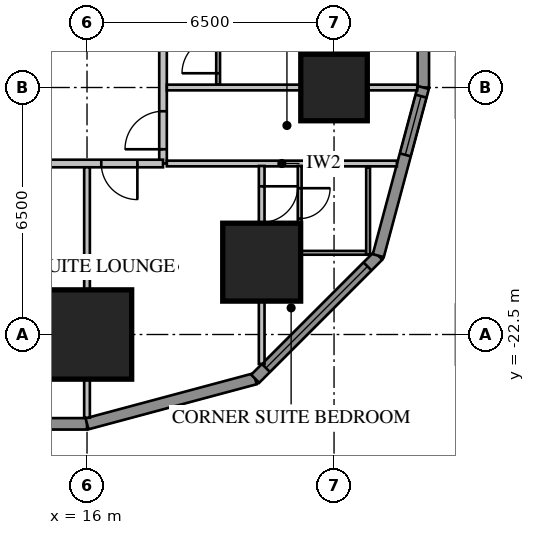
"""IFC4 building model, lengths in metres.
Left out: names, types, materials, properties, quantities, classifications, styles, units other than length and angle.
Written with IfcOpenShell. Run it as: python <this file> out.ifc"""

import sys

from ifc_helpers import new_model, si_unit, direction, frame, frame_2d, origin, origin_2d, place, context, subcontext, project, spatial, rectangle, extrude, element, fill, save


model = new_model("IFC4")
c1 = context("Model", 3, precision=1e-05, world=origin(), true_north=direction((0.0, 1.0)))
c2 = subcontext(c1, "Body", "Model", "MODEL_VIEW")
j1 = project(units=[si_unit("LENGTHUNIT", "METRE"), si_unit("PLANEANGLEUNIT", "RADIAN")], contexts=[c1])
p1 = place(None, origin())
s1 = spatial("IfcSite", under=j1, at=p1, CompositionType="ELEMENT")
p2 = place(p1, origin())
s2 = spatial("IfcBuilding", under=s1, at=p2, CompositionType="ELEMENT")
p3 = place(p2, frame((0.0, 0.0, 50.65)))
s3 = spatial("IfcBuildingStorey", under=s2, at=p3, CompositionType="ELEMENT", Elevation=50.65)
p4 = place(p3, frame((22.5, -16.0, 0.0), z_axis=(0.0, 0.0, 1.0), x_axis=(1.0, 0.0, 0.0)))
e1 = element("IfcColumn", 1, at=p4, inside=s3, PredefinedType="COLUMN", context=c2, shape_type="SweptSolid", body=[
    extrude(rectangle(XDim=1.75, YDim=1.75, at=origin_2d()), origin(), (0.0, 0.0, 1.0), 3.413),
])
p5 = place(p3, frame((16.0, -22.5, 0.0), z_axis=(0.0, 0.0, 1.0), x_axis=(1.0, 0.0, 0.0)))
e2 = element("IfcColumn", 2, at=p5, inside=s3, PredefinedType="COLUMN", context=c2, shape_type="SweptSolid", body=[
    extrude(rectangle(XDim=2.35, YDim=2.35, at=origin_2d()), origin(), (0.0, 0.0, 1.0), 3.413),
])
p6 = place(p3, frame((20.596, -20.596, 0.0), z_axis=(0.0, 0.0, 1.0), x_axis=(1.0, 0.0, 0.0)))
e3 = element("IfcColumn", 3, at=p6, inside=s3, PredefinedType="COLUMN", context=c2, shape_type="SweptSolid", body=[
    extrude(rectangle(XDim=2.05, YDim=2.05, at=origin_2d()), origin(), (0.0, 0.0, 1.0), 3.413),
])
p7 = place(p3, frame((24.85, -16.0, 0.0), z_axis=(0.0, 0.0, 1.0), x_axis=(0.0, 1.0, 0.0)))
e4 = element("IfcWall", 4, at=p7, inside=s3, PredefinedType="SOLIDWALL", context=c2, shape_type="SweptSolid", body=[
    extrude(rectangle(XDim=32.0, YDim=0.3, at=frame_2d((16.0, 0.0))), origin(), (0.0, 0.0, 1.0), 3.65),
])
p8 = place(p7, frame((1.2, 0.0, 0.75)))
e5 = element("IfcOpeningElement", 5, at=p8, cuts=e4, PredefinedType="OPENING", context=c2, shape_type="SweptSolid", body=[
    extrude(rectangle(XDim=1.6, YDim=1.8, at=frame_2d((0.8, 0.9))), frame((0.0, 0.17, 0.0), z_axis=(0.0, -1.0, 0.0), x_axis=(1.0, 0.0, 0.0)), (0.0, 0.0, 1.0), 0.34),
])
p9 = place(p7, frame((5.2, 0.0, 0.75)))
e6 = element("IfcOpeningElement", 6, at=p9, cuts=e4, PredefinedType="OPENING", context=c2, shape_type="SweptSolid", body=[
    extrude(rectangle(XDim=1.6, YDim=1.8, at=frame_2d((0.8, 0.9))), frame((0.0, 0.17, 0.0), z_axis=(0.0, -1.0, 0.0), x_axis=(1.0, 0.0, 0.0)), (0.0, 0.0, 1.0), 0.34),
])
p10 = place(p7, frame((17.2, 0.0, 0.75)))
e7 = element("IfcOpeningElement", 7, at=p10, cuts=e4, PredefinedType="OPENING", context=c2, shape_type="SweptSolid", body=[
    extrude(rectangle(XDim=1.6, YDim=1.8, at=frame_2d((0.8, 0.9))), frame((0.0, 0.17, 0.0), z_axis=(0.0, -1.0, 0.0), x_axis=(1.0, 0.0, 0.0)), (0.0, 0.0, 1.0), 0.34),
])
p11 = place(p7, frame((21.2, 0.0, 0.75)))
e8 = element("IfcOpeningElement", 8, at=p11, cuts=e4, PredefinedType="OPENING", context=c2, shape_type="SweptSolid", body=[
    extrude(rectangle(XDim=1.6, YDim=1.8, at=frame_2d((0.8, 0.9))), frame((0.0, 0.17, 0.0), z_axis=(0.0, -1.0, 0.0), x_axis=(1.0, 0.0, 0.0)), (0.0, 0.0, 1.0), 0.34),
])
p12 = place(p7, frame((25.2, 0.0, 0.75)))
e9 = element("IfcOpeningElement", 9, at=p12, cuts=e4, PredefinedType="OPENING", context=c2, shape_type="SweptSolid", body=[
    extrude(rectangle(XDim=1.6, YDim=1.8, at=frame_2d((0.8, 0.9))), frame((0.0, 0.17, 0.0), z_axis=(0.0, -1.0, 0.0), x_axis=(1.0, 0.0, 0.0)), (0.0, 0.0, 1.0), 0.34),
])
p13 = place(p7, frame((29.2, 0.0, 0.75)))
e10 = element("IfcOpeningElement", 10, at=p13, cuts=e4, PredefinedType="OPENING", context=c2, shape_type="SweptSolid", body=[
    extrude(rectangle(XDim=1.6, YDim=1.8, at=frame_2d((0.8, 0.9))), frame((0.0, 0.17, 0.0), z_axis=(0.0, -1.0, 0.0), x_axis=(1.0, 0.0, 0.0)), (0.0, 0.0, 1.0), 0.34),
])
p14 = place(p7, frame((8.8, 0.0, 0.75)))
e11 = element("IfcOpeningElement", 11, at=p14, cuts=e4, PredefinedType="OPENING", context=c2, shape_type="SweptSolid", body=[
    extrude(rectangle(XDim=2.4, YDim=1.8, at=frame_2d((1.2, 0.9))), frame((0.0, 0.17, 0.0), z_axis=(0.0, -1.0, 0.0), x_axis=(1.0, 0.0, 0.0)), (0.0, 0.0, 1.0), 0.34),
])
p15 = place(p7, frame((13.812, 0.0, 0.0)))
e12 = element("IfcOpeningElement", 12, at=p15, cuts=e4, PredefinedType="OPENING", context=c2, shape_type="SweptSolid", body=[
    extrude(rectangle(XDim=1.0, YDim=2.4, at=frame_2d((0.5, 1.2))), frame((0.0, 0.17, 0.0), z_axis=(0.0, -1.0, 0.0), x_axis=(1.0, 0.0, 0.0)), (0.0, 0.0, 1.0), 0.34),
])
p16 = place(p3, frame((-16.0, -24.85, 0.0), z_axis=(0.0, 0.0, 1.0), x_axis=(1.0, 0.0, 0.0)))
e13 = element("IfcWall", 13, at=p16, inside=s3, PredefinedType="SOLIDWALL", context=c2, shape_type="SweptSolid", body=[
    extrude(rectangle(XDim=32.0, YDim=0.3, at=frame_2d((16.0, 0.0))), origin(), (0.0, 0.0, 1.0), 3.65),
])
p17 = place(p16, frame((1.2, 0.0, 0.75)))
e14 = element("IfcOpeningElement", 14, at=p17, cuts=e13, PredefinedType="OPENING", context=c2, shape_type="SweptSolid", body=[
    extrude(rectangle(XDim=1.6, YDim=1.8, at=frame_2d((0.8, 0.9))), frame((0.0, 0.17, 0.0), z_axis=(0.0, -1.0, 0.0), x_axis=(1.0, 0.0, 0.0)), (0.0, 0.0, 1.0), 0.34),
])
p18 = place(p16, frame((5.2, 0.0, 0.75)))
e15 = element("IfcOpeningElement", 15, at=p18, cuts=e13, PredefinedType="OPENING", context=c2, shape_type="SweptSolid", body=[
    extrude(rectangle(XDim=1.6, YDim=1.8, at=frame_2d((0.8, 0.9))), frame((0.0, 0.17, 0.0), z_axis=(0.0, -1.0, 0.0), x_axis=(1.0, 0.0, 0.0)), (0.0, 0.0, 1.0), 0.34),
])
p19 = place(p16, frame((17.2, 0.0, 0.75)))
e16 = element("IfcOpeningElement", 16, at=p19, cuts=e13, PredefinedType="OPENING", context=c2, shape_type="SweptSolid", body=[
    extrude(rectangle(XDim=1.6, YDim=1.8, at=frame_2d((0.8, 0.9))), frame((0.0, 0.17, 0.0), z_axis=(0.0, -1.0, 0.0), x_axis=(1.0, 0.0, 0.0)), (0.0, 0.0, 1.0), 0.34),
])
p20 = place(p16, frame((21.2, 0.0, 0.75)))
e17 = element("IfcOpeningElement", 17, at=p20, cuts=e13, PredefinedType="OPENING", context=c2, shape_type="SweptSolid", body=[
    extrude(rectangle(XDim=1.6, YDim=1.8, at=frame_2d((0.8, 0.9))), frame((0.0, 0.17, 0.0), z_axis=(0.0, -1.0, 0.0), x_axis=(1.0, 0.0, 0.0)), (0.0, 0.0, 1.0), 0.34),
])
p21 = place(p16, frame((25.2, 0.0, 0.75)))
e18 = element("IfcOpeningElement", 18, at=p21, cuts=e13, PredefinedType="OPENING", context=c2, shape_type="SweptSolid", body=[
    extrude(rectangle(XDim=1.6, YDim=1.8, at=frame_2d((0.8, 0.9))), frame((0.0, 0.17, 0.0), z_axis=(0.0, -1.0, 0.0), x_axis=(1.0, 0.0, 0.0)), (0.0, 0.0, 1.0), 0.34),
])
p22 = place(p16, frame((29.2, 0.0, 0.75)))
e19 = element("IfcOpeningElement", 19, at=p22, cuts=e13, PredefinedType="OPENING", context=c2, shape_type="SweptSolid", body=[
    extrude(rectangle(XDim=1.6, YDim=1.8, at=frame_2d((0.8, 0.9))), frame((0.0, 0.17, 0.0), z_axis=(0.0, -1.0, 0.0), x_axis=(1.0, 0.0, 0.0)), (0.0, 0.0, 1.0), 0.34),
])
p23 = place(p16, frame((8.8, 0.0, 0.75)))
e20 = element("IfcOpeningElement", 20, at=p23, cuts=e13, PredefinedType="OPENING", context=c2, shape_type="SweptSolid", body=[
    extrude(rectangle(XDim=2.4, YDim=1.8, at=frame_2d((1.2, 0.9))), frame((0.0, 0.17, 0.0), z_axis=(0.0, -1.0, 0.0), x_axis=(1.0, 0.0, 0.0)), (0.0, 0.0, 1.0), 0.34),
])
p24 = place(p16, frame((13.812, 0.0, 0.0)))
e21 = element("IfcOpeningElement", 21, at=p24, cuts=e13, PredefinedType="OPENING", context=c2, shape_type="SweptSolid", body=[
    extrude(rectangle(XDim=1.0, YDim=2.4, at=frame_2d((0.5, 1.2))), frame((0.0, 0.17, 0.0), z_axis=(0.0, -1.0, 0.0), x_axis=(1.0, 0.0, 0.0)), (0.0, 0.0, 1.0), 0.34),
])
p25 = place(p3, frame((16.0, -24.85, 0.0), z_axis=(0.0, 0.0, 1.0), x_axis=(0.965920218567, 0.258839972501, 0.0)))
e22 = element("IfcWall", 22, at=p25, inside=s3, PredefinedType="SOLIDWALL", context=c2, shape_type="SweptSolid", body=[
    extrude(rectangle(XDim=4.581, YDim=0.3, at=frame_2d((2.291, 0.0))), origin(), (0.0, 0.0, 1.0), 3.65),
])
p26 = place(p3, frame((20.425, -23.664, 0.0), z_axis=(0.0, 0.0, 1.0), x_axis=(0.707106781187, 0.707106781187, 0.0)))
e23 = element("IfcWall", 23, at=p26, inside=s3, PredefinedType="SOLIDWALL", context=c2, shape_type="SweptSolid", body=[
    extrude(rectangle(XDim=4.581, YDim=0.3, at=frame_2d((2.291, 0.0))), origin(), (0.0, 0.0, 1.0), 3.65),
])
p27 = place(p26, frame((0.4, 0.0, 0.75)))
e24 = element("IfcOpeningElement", 24, at=p27, cuts=e23, PredefinedType="OPENING", context=c2, shape_type="SweptSolid", body=[
    extrude(rectangle(XDim=3.781, YDim=1.8, at=frame_2d((1.891, 0.9))), frame((0.0, 0.17, 0.0), z_axis=(0.0, -1.0, 0.0), x_axis=(1.0, 0.0, 0.0)), (0.0, 0.0, 1.0), 0.34),
])
p28 = place(p3, frame((23.664, -20.425, 0.0), z_axis=(0.0, 0.0, 1.0), x_axis=(0.258839972501, 0.965920218567, 0.0)))
e25 = element("IfcWall", 25, at=p28, inside=s3, PredefinedType="SOLIDWALL", context=c2, shape_type="SweptSolid", body=[
    extrude(rectangle(XDim=4.581, YDim=0.3, at=frame_2d((2.291, 0.0))), origin(), (0.0, 0.0, 1.0), 3.65),
])
p29 = place(p28, frame((2.746, 0.0, 0.75)))
e26 = element("IfcOpeningElement", 26, at=p29, cuts=e25, PredefinedType="OPENING", context=c2, shape_type="SweptSolid", body=[
    extrude(rectangle(XDim=1.6, YDim=1.8, at=frame_2d((0.8, 0.9))), frame((0.0, 0.17, 0.0), z_axis=(0.0, -1.0, 0.0), x_axis=(1.0, 0.0, 0.0)), (0.0, 0.0, 1.0), 0.34),
])
p30 = place(p3, frame((18.0, -18.0, 0.0), z_axis=(0.0, 0.0, 1.0), x_axis=(0.0, 1.0, 0.0)))
e27 = element("IfcWall", 27, at=p30, inside=s3, PredefinedType="PARTITIONING", context=c2, shape_type="SweptSolid", body=[
    extrude(rectangle(XDim=36.0, YDim=0.2, at=frame_2d((18.0, 0.0))), origin(), (0.0, 0.0, 1.0), 3.65),
])
p31 = place(p30, frame((10.4, 0.0, 0.0)))
e28 = element("IfcOpeningElement", 28, at=p31, cuts=e27, PredefinedType="OPENING", context=c2, shape_type="SweptSolid", body=[
    extrude(rectangle(XDim=1.0, YDim=2.1, at=frame_2d((0.5, 1.05))), frame((0.0, 0.12, 0.0), z_axis=(0.0, -1.0, 0.0), x_axis=(1.0, 0.0, 0.0)), (0.0, 0.0, 1.0), 0.24),
])
p32 = place(p30, frame((14.4, 0.0, 0.0)))
e29 = element("IfcOpeningElement", 29, at=p32, cuts=e27, PredefinedType="OPENING", context=c2, shape_type="SweptSolid", body=[
    extrude(rectangle(XDim=1.0, YDim=2.1, at=frame_2d((0.5, 1.05))), frame((0.0, 0.12, 0.0), z_axis=(0.0, -1.0, 0.0), x_axis=(1.0, 0.0, 0.0)), (0.0, 0.0, 1.0), 0.24),
])
p33 = place(p30, frame((0.375, 0.0, 0.0)))
e30 = element("IfcOpeningElement", 30, at=p33, cuts=e27, PredefinedType="OPENING", context=c2, shape_type="SweptSolid", body=[
    extrude(rectangle(XDim=1.0, YDim=2.1, at=frame_2d((0.5, 1.05))), frame((0.0, 0.12, 0.0), z_axis=(0.0, -1.0, 0.0), x_axis=(1.0, 0.0, 0.0)), (0.0, 0.0, 1.0), 0.24),
])
p34 = place(p30, frame((34.375, 0.0, 0.0)))
e31 = element("IfcOpeningElement", 31, at=p34, cuts=e27, PredefinedType="OPENING", context=c2, shape_type="SweptSolid", body=[
    extrude(rectangle(XDim=0.95, YDim=2.1, at=frame_2d((0.475, 1.05))), frame((0.0, 0.12, 0.0), z_axis=(0.0, -1.0, 0.0), x_axis=(1.0, 0.0, 0.0)), (0.0, 0.0, 1.0), 0.24),
])
p35 = place(p3, frame((19.45, -15.925, 0.0), z_axis=(0.0, 0.0, 1.0), x_axis=(0.0, 1.0, 0.0)))
e32 = element("IfcWall", 32, at=p35, inside=s3, PredefinedType="PARTITIONING", context=c2, shape_type="SweptSolid", body=[
    extrude(rectangle(XDim=11.85, YDim=0.1, at=frame_2d((5.925, 0.0))), origin(), (0.0, 0.0, 1.0), 3.65),
])
p36 = place(p35, frame((10.125, 0.0, 0.0)))
e33 = element("IfcOpeningElement", 33, at=p36, cuts=e32, PredefinedType="OPENING", context=c2, shape_type="SweptSolid", body=[
    extrude(rectangle(XDim=1.0, YDim=2.1, at=frame_2d((0.5, 1.05))), frame((0.0, 0.07, 0.0), z_axis=(0.0, -1.0, 0.0), x_axis=(1.0, 0.0, 0.0)), (0.0, 0.0, 1.0), 0.14),
])
p37 = place(p35, frame((8.3, 0.0, 0.0)))
e34 = element("IfcOpeningElement", 34, at=p37, cuts=e32, PredefinedType="OPENING", context=c2, shape_type="SweptSolid", body=[
    extrude(rectangle(XDim=0.8, YDim=2.1, at=frame_2d((0.4, 1.05))), frame((0.0, 0.07, 0.0), z_axis=(0.0, -1.0, 0.0), x_axis=(1.0, 0.0, 0.0)), (0.0, 0.0, 1.0), 0.14),
])
p38 = place(p35, frame((0.3, 0.0, 0.0)))
e35 = element("IfcOpeningElement", 35, at=p38, cuts=e32, PredefinedType="OPENING", context=c2, shape_type="SweptSolid", body=[
    extrude(rectangle(XDim=0.95, YDim=2.1, at=frame_2d((0.475, 1.05))), frame((0.0, 0.07, 0.0), z_axis=(0.0, -1.0, 0.0), x_axis=(1.0, 0.0, 0.0)), (0.0, 0.0, 1.0), 0.14),
])
p39 = place(p35, frame((4.3, 0.0, 0.0)))
e36 = element("IfcOpeningElement", 36, at=p39, cuts=e32, PredefinedType="OPENING", context=c2, shape_type="SweptSolid", body=[
    extrude(rectangle(XDim=0.95, YDim=2.1, at=frame_2d((0.475, 1.05))), frame((0.0, 0.07, 0.0), z_axis=(0.0, -1.0, 0.0), x_axis=(1.0, 0.0, 0.0)), (0.0, 0.0, 1.0), 0.14),
])
p40 = place(p3, frame((18.1, -18.0, 0.0), z_axis=(0.0, 0.0, 1.0), x_axis=(1.0, 0.0, 0.0)))
e37 = element("IfcWall", 37, at=p40, inside=s3, PredefinedType="PARTITIONING", context=c2, shape_type="SweptSolid", body=[
    extrude(rectangle(XDim=6.053, YDim=0.15, at=frame_2d((3.027, 0.0))), origin(), (0.0, 0.0, 1.0), 3.65),
])
p41 = place(p3, frame((18.1, -16.0, 0.0), z_axis=(0.0, 0.0, 1.0), x_axis=(1.0, 0.0, 0.0)))
e38 = element("IfcWall", 38, at=p41, inside=s3, PredefinedType="PARTITIONING", context=c2, shape_type="SweptSolid", body=[
    extrude(rectangle(XDim=6.589, YDim=0.15, at=frame_2d((3.295, 0.0))), origin(), (0.0, 0.0, 1.0), 3.65),
])
p42 = place(p3, frame((-18.0, -18.0, 0.0), z_axis=(0.0, 0.0, 1.0), x_axis=(1.0, 0.0, 0.0)))
e39 = element("IfcWall", 39, at=p42, inside=s3, PredefinedType="PARTITIONING", context=c2, shape_type="SweptSolid", body=[
    extrude(rectangle(XDim=36.0, YDim=0.2, at=frame_2d((18.0, 0.0))), origin(), (0.0, 0.0, 1.0), 3.65),
])
p43 = place(p42, frame((0.375, 0.0, 0.0)))
e40 = element("IfcOpeningElement", 40, at=p43, cuts=e39, PredefinedType="OPENING", context=c2, shape_type="SweptSolid", body=[
    extrude(rectangle(XDim=1.0, YDim=2.1, at=frame_2d((0.5, 1.05))), frame((0.0, 0.12, 0.0), z_axis=(0.0, -1.0, 0.0), x_axis=(1.0, 0.0, 0.0)), (0.0, 0.0, 1.0), 0.24),
])
p44 = place(p42, frame((2.45, 0.0, 0.0)))
e41 = element("IfcOpeningElement", 41, at=p44, cuts=e39, PredefinedType="OPENING", context=c2, shape_type="SweptSolid", body=[
    extrude(rectangle(XDim=0.8, YDim=2.1, at=frame_2d((0.4, 1.05))), frame((0.0, 0.12, 0.0), z_axis=(0.0, -1.0, 0.0), x_axis=(1.0, 0.0, 0.0)), (0.0, 0.0, 1.0), 0.24),
])
p45 = place(p42, frame((4.05, 0.0, 0.0)))
e42 = element("IfcOpeningElement", 42, at=p45, cuts=e39, PredefinedType="OPENING", context=c2, shape_type="SweptSolid", body=[
    extrude(rectangle(XDim=1.0, YDim=2.1, at=frame_2d((0.5, 1.05))), frame((0.0, 0.12, 0.0), z_axis=(0.0, -1.0, 0.0), x_axis=(1.0, 0.0, 0.0)), (0.0, 0.0, 1.0), 0.24),
])
p46 = place(p42, frame((6.45, 0.0, 0.0)))
e43 = element("IfcOpeningElement", 43, at=p46, cuts=e39, PredefinedType="OPENING", context=c2, shape_type="SweptSolid", body=[
    extrude(rectangle(XDim=0.9, YDim=2.1, at=frame_2d((0.45, 1.05))), frame((0.0, 0.12, 0.0), z_axis=(0.0, -1.0, 0.0), x_axis=(1.0, 0.0, 0.0)), (0.0, 0.0, 1.0), 0.24),
])
p47 = place(p42, frame((8.15, 0.0, 0.0)))
e44 = element("IfcOpeningElement", 44, at=p47, cuts=e39, PredefinedType="OPENING", context=c2, shape_type="SweptSolid", body=[
    extrude(rectangle(XDim=1.0, YDim=2.1, at=frame_2d((0.5, 1.05))), frame((0.0, 0.12, 0.0), z_axis=(0.0, -1.0, 0.0), x_axis=(1.0, 0.0, 0.0)), (0.0, 0.0, 1.0), 0.24),
])
p48 = place(p42, frame((19.95, 0.0, 0.0)))
e45 = element("IfcOpeningElement", 45, at=p48, cuts=e39, PredefinedType="OPENING", context=c2, shape_type="SweptSolid", body=[
    extrude(rectangle(XDim=0.95, YDim=2.1, at=frame_2d((0.475, 1.05))), frame((0.0, 0.12, 0.0), z_axis=(0.0, -1.0, 0.0), x_axis=(1.0, 0.0, 0.0)), (0.0, 0.0, 1.0), 0.24),
])
p49 = place(p42, frame((23.95, 0.0, 0.0)))
e46 = element("IfcOpeningElement", 46, at=p49, cuts=e39, PredefinedType="OPENING", context=c2, shape_type="SweptSolid", body=[
    extrude(rectangle(XDim=0.95, YDim=2.1, at=frame_2d((0.475, 1.05))), frame((0.0, 0.12, 0.0), z_axis=(0.0, -1.0, 0.0), x_axis=(1.0, 0.0, 0.0)), (0.0, 0.0, 1.0), 0.24),
])
p50 = place(p42, frame((27.95, 0.0, 0.0)))
e47 = element("IfcOpeningElement", 47, at=p50, cuts=e39, PredefinedType="OPENING", context=c2, shape_type="SweptSolid", body=[
    extrude(rectangle(XDim=0.95, YDim=2.1, at=frame_2d((0.475, 1.05))), frame((0.0, 0.12, 0.0), z_axis=(0.0, -1.0, 0.0), x_axis=(1.0, 0.0, 0.0)), (0.0, 0.0, 1.0), 0.24),
])
p51 = place(p42, frame((31.95, 0.0, 0.0)))
e48 = element("IfcOpeningElement", 48, at=p51, cuts=e39, PredefinedType="OPENING", context=c2, shape_type="SweptSolid", body=[
    extrude(rectangle(XDim=0.95, YDim=2.1, at=frame_2d((0.475, 1.05))), frame((0.0, 0.12, 0.0), z_axis=(0.0, -1.0, 0.0), x_axis=(1.0, 0.0, 0.0)), (0.0, 0.0, 1.0), 0.24),
])
p52 = place(p42, frame((34.375, 0.0, 0.0)))
e49 = element("IfcOpeningElement", 49, at=p52, cuts=e39, PredefinedType="OPENING", context=c2, shape_type="SweptSolid", body=[
    extrude(rectangle(XDim=0.95, YDim=2.1, at=frame_2d((0.475, 1.05))), frame((0.0, 0.12, 0.0), z_axis=(0.0, -1.0, 0.0), x_axis=(1.0, 0.0, 0.0)), (0.0, 0.0, 1.0), 0.24),
])
p53 = place(p42, frame((11.2, 0.0, 0.0)))
e50 = element("IfcOpeningElement", 50, at=p53, cuts=e39, PredefinedType="OPENING", context=c2, shape_type="SweptSolid", body=[
    extrude(rectangle(XDim=1.0, YDim=2.1, at=frame_2d((0.5, 1.05))), frame((0.0, 0.12, 0.0), z_axis=(0.0, -1.0, 0.0), x_axis=(1.0, 0.0, 0.0)), (0.0, 0.0, 1.0), 0.24),
])
p54 = place(p3, frame((16.0, -18.1, 0.0), z_axis=(0.0, 0.0, 1.0), x_axis=(0.0, -1.0, 0.0)))
e51 = element("IfcWall", 51, at=p54, inside=s3, PredefinedType="PARTITIONING", context=c2, shape_type="SweptSolid", body=[
    extrude(rectangle(XDim=6.589, YDim=0.15, at=frame_2d((3.295, 0.0))), origin(), (0.0, 0.0, 1.0), 3.65),
])
p55 = place(p3, frame((21.596, -18.065, 0.0), z_axis=(0.0, 0.0, 1.0), x_axis=(0.0, -1.0, 0.0)))
e52 = element("IfcWall", 52, at=p55, inside=s3, PredefinedType="PARTITIONING", context=c2, shape_type="SweptSolid", body=[
    extrude(rectangle(XDim=2.335, YDim=0.1, at=frame_2d((1.167, 0.0))), origin(), (0.0, 0.0, 1.0), 3.65),
])
p56 = place(p55, frame((0.585, 0.0, 0.0)))
e53 = element("IfcOpeningElement", 53, at=p56, cuts=e52, PredefinedType="OPENING", context=c2, shape_type="SweptSolid", body=[
    extrude(rectangle(XDim=0.8, YDim=2.1, at=frame_2d((0.4, 1.05))), frame((0.0, 0.07, 0.0), z_axis=(0.0, -1.0, 0.0), x_axis=(1.0, 0.0, 0.0)), (0.0, 0.0, 1.0), 0.14),
])
p57 = place(p3, frame((21.646, -20.35, 0.0), z_axis=(0.0, 0.0, 1.0), x_axis=(1.0, 0.0, 0.0)))
e54 = element("IfcWall", 54, at=p57, inside=s3, PredefinedType="PARTITIONING", context=c2, shape_type="SweptSolid", body=[
    extrude(rectangle(XDim=1.7, YDim=0.1, at=frame_2d((0.85, 0.0))), origin(), (0.0, 0.0, 1.0), 3.65),
])
p58 = place(p3, frame((23.396, -18.1, 0.0), z_axis=(0.0, 0.0, 1.0), x_axis=(0.0, -1.0, 0.0)))
e55 = element("IfcWall", 55, at=p58, inside=s3, PredefinedType="PARTITIONING", context=c2, shape_type="SweptSolid", body=[
    extrude(rectangle(XDim=2.3, YDim=0.1, at=frame_2d((1.15, 0.0))), origin(), (0.0, 0.0, 1.0), 3.65),
])
p59 = place(p3, frame((20.596, -18.065, 0.0), z_axis=(0.0, 0.0, 1.0), x_axis=(0.0, -1.0, 0.0)))
e56 = element("IfcWall", 56, at=p59, inside=s3, PredefinedType="PARTITIONING", context=c2, shape_type="SweptSolid", body=[
    extrude(rectangle(XDim=5.209, YDim=0.15, at=frame_2d((2.604, 0.0))), origin(), (0.0, 0.0, 1.0), 3.65),
])
p60 = place(p59, frame((0.535, 0.0, 0.0)))
e57 = element("IfcOpeningElement", 57, at=p60, cuts=e56, PredefinedType="OPENING", context=c2, shape_type="SweptSolid", body=[
    extrude(rectangle(XDim=0.95, YDim=2.1, at=frame_2d((0.475, 1.05))), frame((0.0, 0.095, 0.0), z_axis=(0.0, -1.0, 0.0), x_axis=(1.0, 0.0, 0.0)), (0.0, 0.0, 1.0), 0.19),
])
p61 = place(p29, origin())
e58 = element("IfcWindow", 58, at=p61, inside=s3, PartitioningType="SINGLE_PANEL", PredefinedType="WINDOW", context=c2, shape_type="SweptSolid", body=[
    extrude(rectangle(XDim=1.6, YDim=1.8, at=frame_2d((0.8, 0.9))), frame((0.0, 0.03, 0.0), z_axis=(0.0, -1.0, 0.0), x_axis=(1.0, 0.0, 0.0)), (0.0, 0.0, 1.0), 0.06),
])
fill(e26, e58)
p62 = place(p27, origin())
e59 = element("IfcWindow", 59, at=p62, inside=s3, PartitioningType="SINGLE_PANEL", PredefinedType="WINDOW", context=c2, shape_type="SweptSolid", body=[
    extrude(rectangle(XDim=3.781, YDim=1.8, at=frame_2d((1.891, 0.9))), frame((0.0, 0.03, 0.0), z_axis=(0.0, -1.0, 0.0), x_axis=(1.0, 0.0, 0.0)), (0.0, 0.0, 1.0), 0.06),
])
fill(e24, e59)
p63 = place(p33, origin())
e60 = element("IfcDoor", 60, at=p63, inside=s3, OperationType="SINGLE_SWING_LEFT", PredefinedType="DOOR", context=c2, shape_type="SweptSolid", body=[
    extrude(rectangle(XDim=1.0, YDim=2.1, at=frame_2d((0.5, 1.05))), frame((0.0, 0.025, 0.0), z_axis=(0.0, -1.0, 0.0), x_axis=(1.0, 0.0, 0.0)), (0.0, 0.0, 1.0), 0.05),
])
fill(e30, e60)
p64 = place(p38, origin())
e61 = element("IfcDoor", 61, at=p64, inside=s3, OperationType="SINGLE_SWING_LEFT", PredefinedType="DOOR", context=c2, shape_type="SweptSolid", body=[
    extrude(rectangle(XDim=0.95, YDim=2.1, at=frame_2d((0.475, 1.05))), frame((0.0, 0.025, 0.0), z_axis=(0.0, -1.0, 0.0), x_axis=(1.0, 0.0, 0.0)), (0.0, 0.0, 1.0), 0.05),
])
fill(e35, e61)
p65 = place(p52, origin())
e62 = element("IfcDoor", 62, at=p65, inside=s3, OperationType="SINGLE_SWING_RIGHT", PredefinedType="DOOR", context=c2, shape_type="SweptSolid", body=[
    extrude(rectangle(XDim=0.95, YDim=2.1, at=frame_2d((0.475, 1.05))), frame((0.0, 0.025, 0.0), z_axis=(0.0, -1.0, 0.0), x_axis=(1.0, 0.0, 0.0)), (0.0, 0.0, 1.0), 0.05),
])
fill(e49, e62)
p66 = place(p56, origin())
e63 = element("IfcDoor", 63, at=p66, inside=s3, OperationType="SINGLE_SWING_LEFT", PredefinedType="DOOR", context=c2, shape_type="SweptSolid", body=[
    extrude(rectangle(XDim=0.8, YDim=2.1, at=frame_2d((0.4, 1.05))), frame((0.0, 0.025, 0.0), z_axis=(0.0, -1.0, 0.0), x_axis=(1.0, 0.0, 0.0)), (0.0, 0.0, 1.0), 0.05),
])
fill(e53, e63)
p67 = place(p60, origin())
e64 = element("IfcDoor", 64, at=p67, inside=s3, OperationType="SINGLE_SWING_LEFT", PredefinedType="DOOR", context=c2, shape_type="SweptSolid", body=[
    extrude(rectangle(XDim=0.95, YDim=2.1, at=frame_2d((0.475, 1.05))), frame((0.0, 0.025, 0.0), z_axis=(0.0, -1.0, 0.0), x_axis=(1.0, 0.0, 0.0)), (0.0, 0.0, 1.0), 0.05),
])
fill(e57, e64)
save(model, sys.argv[1])
